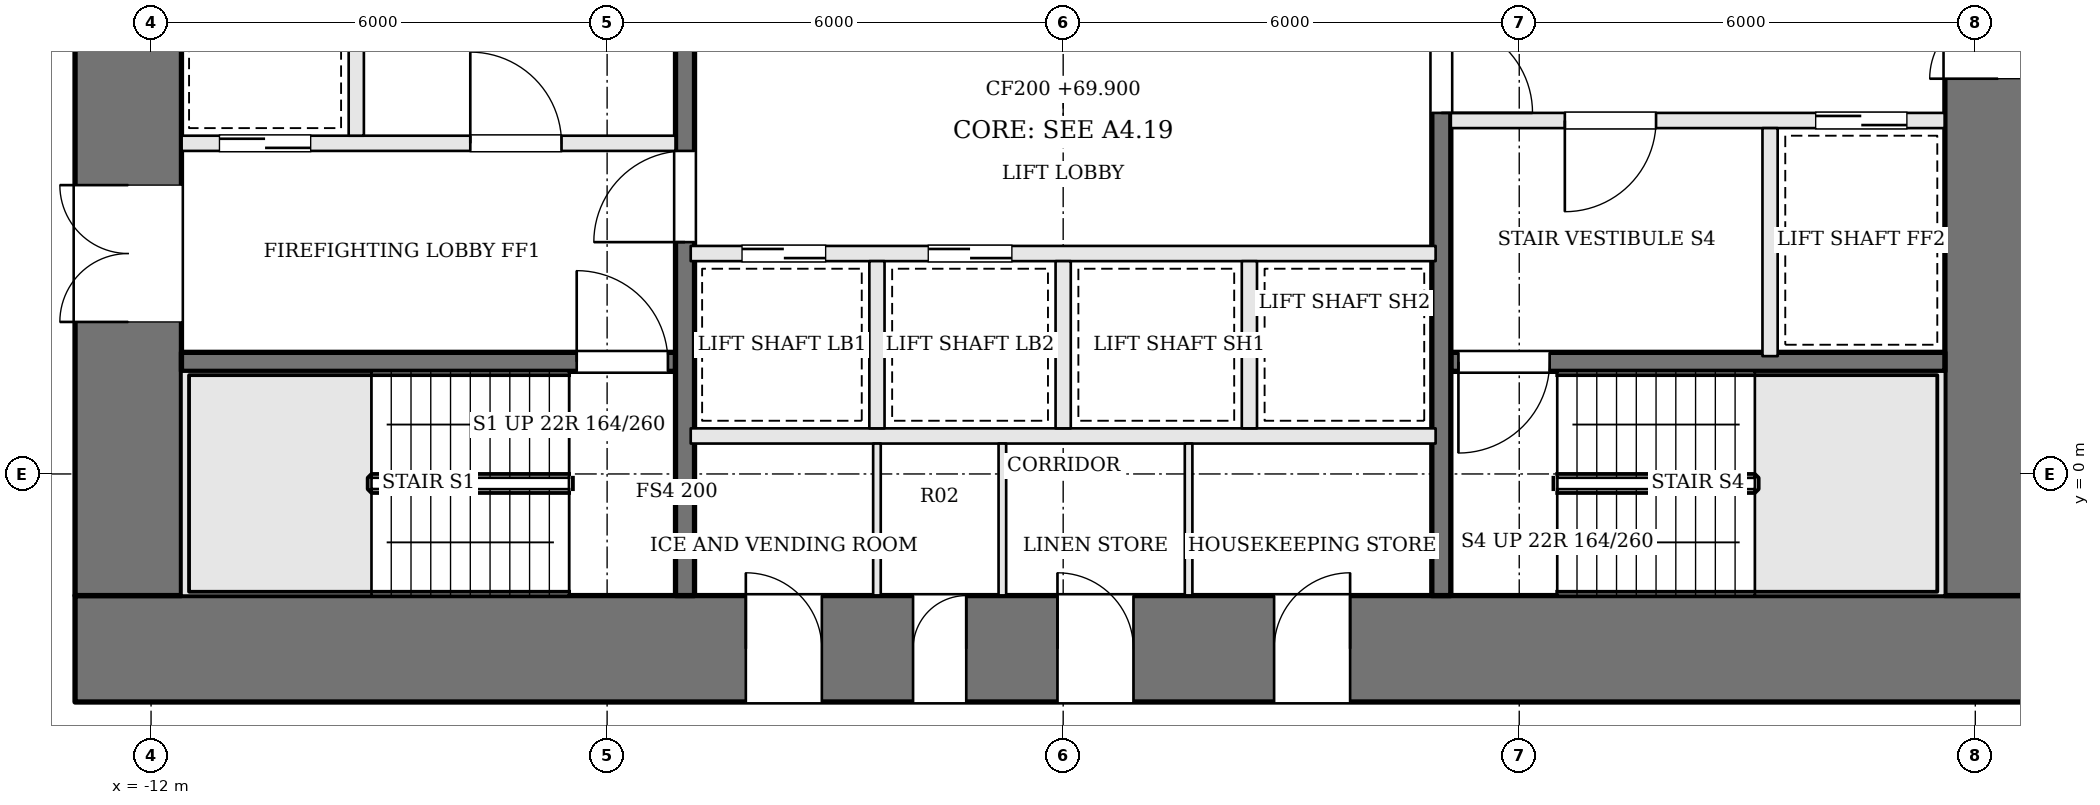
"""IFC4 building model, lengths in metres.
Left out: names, types, materials, properties, quantities, classifications, styles, units other than length and angle.
Written with IfcOpenShell. Run it as: python <this file> out.ifc"""

import sys

from ifc_helpers import new_model, si_unit, direction, frame, frame_2d, origin, place, context, subcontext, project, spatial, rectangle, extrude, element, fill, save


model = new_model("IFC4")
c1 = context("Model", 3, precision=1e-05, world=origin(), true_north=direction((0.0, 1.0)))
c2 = subcontext(c1, "Body", "Model", "MODEL_VIEW")
j1 = project(units=[si_unit("LENGTHUNIT", "METRE"), si_unit("PLANEANGLEUNIT", "RADIAN")], contexts=[c1])
p1 = place(None, origin())
s1 = spatial("IfcSite", under=j1, at=p1, CompositionType="ELEMENT")
p2 = place(p1, origin())
s2 = spatial("IfcBuilding", under=s1, at=p2, CompositionType="ELEMENT")
p3 = place(p2, frame((0.0, 0.0, 69.9)))
s3 = spatial("IfcBuildingStorey", under=s2, at=p3, CompositionType="ELEMENT", Elevation=69.9)
p4 = place(p3, frame((-13.0, -2.3, 0.0), z_axis=(0.0, 0.0, 1.0), x_axis=(1.0, 0.0, 0.0)))
e1 = element("IfcWall", 1, at=p4, inside=s3, PredefinedType="SHEAR", context=c2, shape_type="SweptSolid", body=[
    extrude(rectangle(XDim=26.0, YDim=1.4, at=frame_2d((13.0, 0.0))), origin(), (0.0, 0.0, 1.0), 3.6),
])
p5 = place(p4, frame((8.825, 0.0, 0.0)))
e2 = element("IfcOpeningElement", 2, at=p5, cuts=e1, PredefinedType="OPENING", context=c2, shape_type="SweptSolid", body=[
    extrude(rectangle(XDim=1.0, YDim=2.1, at=frame_2d((0.5, 1.05))), frame((0.0, 0.71, 0.0), z_axis=(0.0, -1.0, 0.0), x_axis=(1.0, 0.0, 0.0)), (0.0, 0.0, 1.0), 1.42),
])
p6 = place(p4, frame((11.025, 0.0, 0.0)))
e3 = element("IfcOpeningElement", 3, at=p6, cuts=e1, PredefinedType="OPENING", context=c2, shape_type="SweptSolid", body=[
    extrude(rectangle(XDim=0.7, YDim=2.1, at=frame_2d((0.35, 1.05))), frame((0.0, 0.71, 0.0), z_axis=(0.0, -1.0, 0.0), x_axis=(1.0, 0.0, 0.0)), (0.0, 0.0, 1.0), 1.42),
])
p7 = place(p4, frame((12.925, 0.0, 0.0)))
e4 = element("IfcOpeningElement", 4, at=p7, cuts=e1, PredefinedType="OPENING", context=c2, shape_type="SweptSolid", body=[
    extrude(rectangle(XDim=1.0, YDim=2.1, at=frame_2d((0.5, 1.05))), frame((0.0, 0.71, 0.0), z_axis=(0.0, -1.0, 0.0), x_axis=(1.0, 0.0, 0.0)), (0.0, 0.0, 1.0), 1.42),
])
p8 = place(p4, frame((15.775, 0.0, 0.0)))
e5 = element("IfcOpeningElement", 5, at=p8, cuts=e1, PredefinedType="OPENING", context=c2, shape_type="SweptSolid", body=[
    extrude(rectangle(XDim=1.0, YDim=2.1, at=frame_2d((0.5, 1.05))), frame((0.0, 0.71, 0.0), z_axis=(0.0, -1.0, 0.0), x_axis=(1.0, 0.0, 0.0)), (0.0, 0.0, 1.0), 1.42),
])
p9 = place(p3, frame((12.3, -1.6, 0.0), z_axis=(0.0, 0.0, 1.0), x_axis=(0.0, 1.0, 0.0)))
e6 = element("IfcWall", 6, at=p9, inside=s3, PredefinedType="SHEAR", context=c2, shape_type="SweptSolid", body=[
    extrude(rectangle(XDim=12.2, YDim=1.4, at=frame_2d((6.1, 0.0))), origin(), (0.0, 0.0, 1.0), 3.6),
])
p10 = place(p9, frame((6.8, 0.0, 0.0)))
e7 = element("IfcOpeningElement", 7, at=p10, cuts=e6, PredefinedType="OPENING", context=c2, shape_type="SweptSolid", body=[
    extrude(rectangle(XDim=1.8, YDim=2.1, at=frame_2d((0.9, 1.05))), frame((0.0, 0.71, 0.0), z_axis=(0.0, -1.0, 0.0), x_axis=(1.0, 0.0, 0.0)), (0.0, 0.0, 1.0), 1.42),
])
p11 = place(p3, frame((-12.3, -1.6, 0.0), z_axis=(0.0, 0.0, 1.0), x_axis=(0.0, 1.0, 0.0)))
e8 = element("IfcWall", 8, at=p11, inside=s3, PredefinedType="SHEAR", context=c2, shape_type="SweptSolid", body=[
    extrude(rectangle(XDim=12.2, YDim=1.4, at=frame_2d((6.1, 0.0))), origin(), (0.0, 0.0, 1.0), 3.6),
])
p12 = place(p11, frame((3.6, 0.0, 0.0)))
e9 = element("IfcOpeningElement", 9, at=p12, cuts=e8, PredefinedType="OPENING", context=c2, shape_type="SweptSolid", body=[
    extrude(rectangle(XDim=1.8, YDim=2.1, at=frame_2d((0.9, 1.05))), frame((0.0, 0.71, 0.0), z_axis=(0.0, -1.0, 0.0), x_axis=(1.0, 0.0, 0.0)), (0.0, 0.0, 1.0), 1.42),
])
p13 = place(p3, frame((-11.6, 1.475, 0.0), z_axis=(0.0, 0.0, 1.0), x_axis=(1.0, 0.0, 0.0)))
e10 = element("IfcWall", 10, at=p13, inside=s3, PredefinedType="SOLIDWALL", context=c2, shape_type="SweptSolid", body=[
    extrude(rectangle(XDim=6.5, YDim=0.25, at=frame_2d((3.25, 0.0))), origin(), (0.0, 0.0, 1.0), 3.4),
])
p14 = place(p13, frame((5.2, 0.0, 0.0)))
e11 = element("IfcOpeningElement", 11, at=p14, cuts=e10, PredefinedType="OPENING", context=c2, shape_type="SweptSolid", body=[
    extrude(rectangle(XDim=1.2, YDim=2.1, at=frame_2d((0.6, 1.05))), frame((0.0, 0.135, 0.0), z_axis=(0.0, -1.0, 0.0), x_axis=(1.0, 0.0, 0.0)), (0.0, 0.0, 1.0), 0.27),
])
p15 = place(p3, frame((-11.6, 4.35, 0.0), z_axis=(0.0, 0.0, 1.0), x_axis=(1.0, 0.0, 0.0)))
e12 = element("IfcWall", 12, at=p15, inside=s3, PredefinedType="SOLIDWALL", context=c2, shape_type="SweptSolid", body=[
    extrude(rectangle(XDim=6.5, YDim=0.2, at=frame_2d((3.25, 0.0))), origin(), (0.0, 0.0, 1.0), 3.4),
])
p16 = place(p15, frame((3.8, 0.0, 0.0)))
e13 = element("IfcOpeningElement", 13, at=p16, cuts=e12, PredefinedType="OPENING", context=c2, shape_type="SweptSolid", body=[
    extrude(rectangle(XDim=1.2, YDim=2.1, at=frame_2d((0.6, 1.05))), frame((0.0, 0.11, 0.0), z_axis=(0.0, -1.0, 0.0), x_axis=(1.0, 0.0, 0.0)), (0.0, 0.0, 1.0), 0.22),
])
p17 = place(p15, frame((0.5, 0.0, 0.0)))
e14 = element("IfcOpeningElement", 14, at=p17, cuts=e12, PredefinedType="OPENING", context=c2, shape_type="SweptSolid", body=[
    extrude(rectangle(XDim=1.2, YDim=2.1, at=frame_2d((0.6, 1.05))), frame((0.0, 0.11, 0.0), z_axis=(0.0, -1.0, 0.0), x_axis=(1.0, 0.0, 0.0)), (0.0, 0.0, 1.0), 0.22),
])
p18 = place(p3, frame((11.6, 4.65, 0.0), z_axis=(0.0, 0.0, 1.0), x_axis=(-1.0, 0.0, 0.0)))
e15 = element("IfcWall", 15, at=p18, inside=s3, PredefinedType="SOLIDWALL", context=c2, shape_type="SweptSolid", body=[
    extrude(rectangle(XDim=6.5, YDim=0.2, at=frame_2d((3.25, 0.0))), origin(), (0.0, 0.0, 1.0), 3.4),
])
p19 = place(p18, frame((3.8, 0.0, 0.0)))
e16 = element("IfcOpeningElement", 16, at=p19, cuts=e15, PredefinedType="OPENING", context=c2, shape_type="SweptSolid", body=[
    extrude(rectangle(XDim=1.2, YDim=2.1, at=frame_2d((0.6, 1.05))), frame((0.0, 0.11, 0.0), z_axis=(0.0, -1.0, 0.0), x_axis=(1.0, 0.0, 0.0)), (0.0, 0.0, 1.0), 0.22),
])
p20 = place(p18, frame((0.5, 0.0, 0.0)))
e17 = element("IfcOpeningElement", 17, at=p20, cuts=e15, PredefinedType="OPENING", context=c2, shape_type="SweptSolid", body=[
    extrude(rectangle(XDim=1.2, YDim=2.1, at=frame_2d((0.6, 1.05))), frame((0.0, 0.11, 0.0), z_axis=(0.0, -1.0, 0.0), x_axis=(1.0, 0.0, 0.0)), (0.0, 0.0, 1.0), 0.22),
])
p21 = place(p3, frame((11.6, 1.475, 0.0), z_axis=(0.0, 0.0, 1.0), x_axis=(-1.0, 0.0, 0.0)))
e18 = element("IfcWall", 18, at=p21, inside=s3, PredefinedType="SOLIDWALL", context=c2, shape_type="SweptSolid", body=[
    extrude(rectangle(XDim=6.5, YDim=0.25, at=frame_2d((3.25, 0.0))), origin(), (0.0, 0.0, 1.0), 3.4),
])
p22 = place(p21, frame((5.2, 0.0, 0.0)))
e19 = element("IfcOpeningElement", 19, at=p22, cuts=e18, PredefinedType="OPENING", context=c2, shape_type="SweptSolid", body=[
    extrude(rectangle(XDim=1.2, YDim=2.1, at=frame_2d((0.6, 1.05))), frame((0.0, 0.135, 0.0), z_axis=(0.0, -1.0, 0.0), x_axis=(1.0, 0.0, 0.0)), (0.0, 0.0, 1.0), 0.27),
])
for number, where, z_axis, x_axis in (
    (20, (-9.3, 4.45, 0.0), (0.0, 0.0, 1.0), (0.0, 1.0, 0.0)),
    (21, (9.3, 4.55, 0.0), (0.0, 0.0, 1.0), (0.0, -1.0, 0.0)),
):
    element("IfcWall", number, at=place(p3, frame(where, z_axis=z_axis, x_axis=x_axis)), inside=s3, PredefinedType="SOLIDWALL", context=c2, shape_type="SweptSolid", body=[
        extrude(rectangle(XDim=3.0, YDim=0.2, at=frame_2d((1.5, 0.0))), origin(), (0.0, 0.0, 1.0), 3.4),
    ])
p23 = place(p3, frame((-4.975, -1.6, 0.0), z_axis=(0.0, 0.0, 1.0), x_axis=(0.0, 1.0, 0.0)))
e22 = element("IfcWall", 22, at=p23, inside=s3, PredefinedType="SOLIDWALL", context=c2, shape_type="SweptSolid", body=[
    extrude(rectangle(XDim=12.2, YDim=0.25, at=frame_2d((6.1, 0.0))), origin(), (0.0, 0.0, 1.0), 3.4),
])
p24 = place(p23, frame((4.65, 0.0, 0.0)))
e23 = element("IfcOpeningElement", 23, at=p24, cuts=e22, PredefinedType="OPENING", context=c2, shape_type="SweptSolid", body=[
    extrude(rectangle(XDim=1.2, YDim=2.1, at=frame_2d((0.6, 1.05))), frame((0.0, 0.135, 0.0), z_axis=(0.0, -1.0, 0.0), x_axis=(1.0, 0.0, 0.0)), (0.0, 0.0, 1.0), 0.27),
])
p25 = place(p3, frame((4.975, 10.6, 0.0), z_axis=(0.0, 0.0, 1.0), x_axis=(0.0, -1.0, 0.0)))
e24 = element("IfcWall", 24, at=p25, inside=s3, PredefinedType="SOLIDWALL", context=c2, shape_type="SweptSolid", body=[
    extrude(rectangle(XDim=12.2, YDim=0.25, at=frame_2d((6.1, 0.0))), origin(), (0.0, 0.0, 1.0), 3.4),
])
p26 = place(p25, frame((4.65, 0.0, 0.0)))
e25 = element("IfcOpeningElement", 25, at=p26, cuts=e24, PredefinedType="OPENING", context=c2, shape_type="SweptSolid", body=[
    extrude(rectangle(XDim=1.2, YDim=2.1, at=frame_2d((0.6, 1.05))), frame((0.0, 0.135, 0.0), z_axis=(0.0, -1.0, 0.0), x_axis=(1.0, 0.0, 0.0)), (0.0, 0.0, 1.0), 0.27),
])
p27 = place(p3, frame((-4.9, 0.5, 0.0), z_axis=(0.0, 0.0, 1.0), x_axis=(1.0, 0.0, 0.0)))
e26 = element("IfcWall", 26, at=p27, inside=s3, PredefinedType="SOLIDWALL", context=c2, shape_type="SweptSolid", body=[
    extrude(rectangle(XDim=9.8, YDim=0.2, at=frame_2d((4.9, 0.0))), origin(), (0.0, 0.0, 1.0), 3.4),
])
p28 = place(p3, frame((-4.9, 2.9, 0.0), z_axis=(0.0, 0.0, 1.0), x_axis=(1.0, 0.0, 0.0)))
e27 = element("IfcWall", 27, at=p28, inside=s3, PredefinedType="SOLIDWALL", context=c2, shape_type="SweptSolid", body=[
    extrude(rectangle(XDim=9.8, YDim=0.2, at=frame_2d((4.9, 0.0))), origin(), (0.0, 0.0, 1.0), 3.4),
])
p29 = place(p28, frame((0.675, 0.0, 0.0)))
e28 = element("IfcOpeningElement", 28, at=p29, cuts=e27, PredefinedType="OPENING", context=c2, shape_type="SweptSolid", body=[
    extrude(rectangle(XDim=1.1, YDim=2.1, at=frame_2d((0.55, 1.05))), frame((0.0, 0.11, 0.0), z_axis=(0.0, -1.0, 0.0), x_axis=(1.0, 0.0, 0.0)), (0.0, 0.0, 1.0), 0.22),
])
p30 = place(p28, frame((3.125, 0.0, 0.0)))
e29 = element("IfcOpeningElement", 29, at=p30, cuts=e27, PredefinedType="OPENING", context=c2, shape_type="SweptSolid", body=[
    extrude(rectangle(XDim=1.1, YDim=2.1, at=frame_2d((0.55, 1.05))), frame((0.0, 0.11, 0.0), z_axis=(0.0, -1.0, 0.0), x_axis=(1.0, 0.0, 0.0)), (0.0, 0.0, 1.0), 0.22),
])
for number, where, z_axis, x_axis in (
    (30, (-2.45, 0.6, 0.0), (0.0, 0.0, 1.0), (0.0, 1.0, 0.0)),
    (31, (0.0, 0.6, 0.0), (0.0, 0.0, 1.0), (0.0, 1.0, 0.0)),
    (32, (2.45, 0.6, 0.0), (0.0, 0.0, 1.0), (0.0, 1.0, 0.0)),
):
    element("IfcWall", number, at=place(p3, frame(where, z_axis=z_axis, x_axis=x_axis)), inside=s3, PredefinedType="SOLIDWALL", context=c2, shape_type="SweptSolid", body=[
        extrude(rectangle(XDim=2.2, YDim=0.2, at=frame_2d((1.1, 0.0))), origin(), (0.0, 0.0, 1.0), 3.4),
    ])
for number, where, z_axis, x_axis in (
    (33, (-2.45, -1.6, 0.0), (0.0, 0.0, 1.0), (0.0, 1.0, 0.0)),
    (34, (-0.8, -1.6, 0.0), (0.0, 0.0, 1.0), (0.0, 1.0, 0.0)),
    (35, (1.65, -1.6, 0.0), (0.0, 0.0, 1.0), (0.0, 1.0, 0.0)),
):
    element("IfcWall", number, at=place(p3, frame(where, z_axis=z_axis, x_axis=x_axis)), inside=s3, PredefinedType="PARTITIONING", context=c2, shape_type="SweptSolid", body=[
        extrude(rectangle(XDim=2.0, YDim=0.1, at=frame_2d((1.0, 0.0))), origin(), (0.0, 0.0, 1.0), 3.4),
    ])
p31 = place(p12, origin())
e36 = element("IfcDoor", 36, at=p31, inside=s3, OperationType="DOUBLE_DOOR_SINGLE_SWING", PredefinedType="DOOR", context=c2, shape_type="SweptSolid", body=[
    extrude(rectangle(XDim=1.8, YDim=2.1, at=frame_2d((0.9, 1.05))), frame((0.0, 0.025, 0.0), z_axis=(0.0, -1.0, 0.0), x_axis=(1.0, 0.0, 0.0)), (0.0, 0.0, 1.0), 0.05),
])
fill(e9, e36)
p32 = place(p10, origin())
e37 = element("IfcDoor", 37, at=p32, inside=s3, OperationType="DOUBLE_DOOR_SINGLE_SWING", PredefinedType="DOOR", context=c2, shape_type="SweptSolid", body=[
    extrude(rectangle(XDim=1.8, YDim=2.1, at=frame_2d((0.9, 1.05))), frame((0.0, 0.025, 0.0), z_axis=(0.0, -1.0, 0.0), x_axis=(1.0, 0.0, 0.0)), (0.0, 0.0, 1.0), 0.05),
])
fill(e7, e37)
p33 = place(p24, origin())
e38 = element("IfcDoor", 38, at=p33, inside=s3, OperationType="SINGLE_SWING_LEFT", PredefinedType="DOOR", context=c2, shape_type="SweptSolid", body=[
    extrude(rectangle(XDim=1.2, YDim=2.1, at=frame_2d((0.6, 1.05))), frame((0.0, 0.025, 0.0), z_axis=(0.0, -1.0, 0.0), x_axis=(1.0, 0.0, 0.0)), (0.0, 0.0, 1.0), 0.05),
])
fill(e23, e38)
p34 = place(p26, origin())
e39 = element("IfcDoor", 39, at=p34, inside=s3, OperationType="SINGLE_SWING_RIGHT", PredefinedType="DOOR", context=c2, shape_type="SweptSolid", body=[
    extrude(rectangle(XDim=1.2, YDim=2.1, at=frame_2d((0.6, 1.05))), frame((0.0, 0.025, 0.0), z_axis=(0.0, -1.0, 0.0), x_axis=(1.0, 0.0, 0.0)), (0.0, 0.0, 1.0), 0.05),
])
fill(e25, e39)
p35 = place(p16, origin())
e40 = element("IfcDoor", 40, at=p35, inside=s3, OperationType="SINGLE_SWING_LEFT", PredefinedType="DOOR", context=c2, shape_type="SweptSolid", body=[
    extrude(rectangle(XDim=1.2, YDim=2.1, at=frame_2d((0.6, 1.05))), frame((0.0, 0.025, 0.0), z_axis=(0.0, -1.0, 0.0), x_axis=(1.0, 0.0, 0.0)), (0.0, 0.0, 1.0), 0.05),
])
fill(e13, e40)
p36 = place(p19, origin())
e41 = element("IfcDoor", 41, at=p36, inside=s3, OperationType="SINGLE_SWING_RIGHT", PredefinedType="DOOR", context=c2, shape_type="SweptSolid", body=[
    extrude(rectangle(XDim=1.2, YDim=2.1, at=frame_2d((0.6, 1.05))), frame((0.0, 0.025, 0.0), z_axis=(0.0, -1.0, 0.0), x_axis=(1.0, 0.0, 0.0)), (0.0, 0.0, 1.0), 0.05),
])
fill(e16, e41)
p37 = place(p14, origin())
e42 = element("IfcDoor", 42, at=p37, inside=s3, OperationType="SINGLE_SWING_LEFT", PredefinedType="DOOR", context=c2, shape_type="SweptSolid", body=[
    extrude(rectangle(XDim=1.2, YDim=2.1, at=frame_2d((0.6, 1.05))), frame((0.0, 0.025, 0.0), z_axis=(0.0, -1.0, 0.0), x_axis=(1.0, 0.0, 0.0)), (0.0, 0.0, 1.0), 0.05),
])
fill(e11, e42)
p38 = place(p22, origin())
e43 = element("IfcDoor", 43, at=p38, inside=s3, OperationType="SINGLE_SWING_RIGHT", PredefinedType="DOOR", context=c2, shape_type="SweptSolid", body=[
    extrude(rectangle(XDim=1.2, YDim=2.1, at=frame_2d((0.6, 1.05))), frame((0.0, 0.025, 0.0), z_axis=(0.0, -1.0, 0.0), x_axis=(1.0, 0.0, 0.0)), (0.0, 0.0, 1.0), 0.05),
])
fill(e19, e43)
p39 = place(p17, origin())
e44 = element("IfcDoor", 44, at=p39, inside=s3, OperationType="SLIDING_TO_RIGHT", PredefinedType="DOOR", context=c2, shape_type="SweptSolid", body=[
    extrude(rectangle(XDim=1.2, YDim=2.1, at=frame_2d((0.6, 1.05))), frame((0.0, 0.025, 0.0), z_axis=(0.0, -1.0, 0.0), x_axis=(1.0, 0.0, 0.0)), (0.0, 0.0, 1.0), 0.05),
])
fill(e14, e44)
p40 = place(p20, origin())
e45 = element("IfcDoor", 45, at=p40, inside=s3, OperationType="SLIDING_TO_RIGHT", PredefinedType="DOOR", context=c2, shape_type="SweptSolid", body=[
    extrude(rectangle(XDim=1.2, YDim=2.1, at=frame_2d((0.6, 1.05))), frame((0.0, 0.025, 0.0), z_axis=(0.0, -1.0, 0.0), x_axis=(1.0, 0.0, 0.0)), (0.0, 0.0, 1.0), 0.05),
])
fill(e17, e45)
p41 = place(p29, origin())
e46 = element("IfcDoor", 46, at=p41, inside=s3, OperationType="SLIDING_TO_RIGHT", PredefinedType="DOOR", context=c2, shape_type="SweptSolid", body=[
    extrude(rectangle(XDim=1.1, YDim=2.1, at=frame_2d((0.55, 1.05))), frame((0.0, 0.025, 0.0), z_axis=(0.0, -1.0, 0.0), x_axis=(1.0, 0.0, 0.0)), (0.0, 0.0, 1.0), 0.05),
])
fill(e28, e46)
p42 = place(p30, origin())
e47 = element("IfcDoor", 47, at=p42, inside=s3, OperationType="SLIDING_TO_LEFT", PredefinedType="DOOR", context=c2, shape_type="SweptSolid", body=[
    extrude(rectangle(XDim=1.1, YDim=2.1, at=frame_2d((0.55, 1.05))), frame((0.0, 0.025, 0.0), z_axis=(0.0, -1.0, 0.0), x_axis=(1.0, 0.0, 0.0)), (0.0, 0.0, 1.0), 0.05),
])
fill(e29, e47)
p43 = place(p5, origin())
e48 = element("IfcDoor", 48, at=p43, inside=s3, OperationType="SINGLE_SWING_LEFT", PredefinedType="DOOR", context=c2, shape_type="SweptSolid", body=[
    extrude(rectangle(XDim=1.0, YDim=2.1, at=frame_2d((0.5, 1.05))), frame((0.0, 0.025, 0.0), z_axis=(0.0, -1.0, 0.0), x_axis=(1.0, 0.0, 0.0)), (0.0, 0.0, 1.0), 0.05),
])
fill(e2, e48)
p44 = place(p6, origin())
e49 = element("IfcDoor", 49, at=p44, inside=s3, OperationType="SINGLE_SWING_RIGHT", PredefinedType="DOOR", context=c2, shape_type="SweptSolid", body=[
    extrude(rectangle(XDim=0.7, YDim=2.1, at=frame_2d((0.35, 1.05))), frame((0.0, 0.025, 0.0), z_axis=(0.0, -1.0, 0.0), x_axis=(1.0, 0.0, 0.0)), (0.0, 0.0, 1.0), 0.05),
])
fill(e3, e49)
p45 = place(p7, origin())
e50 = element("IfcDoor", 50, at=p45, inside=s3, OperationType="SINGLE_SWING_LEFT", PredefinedType="DOOR", context=c2, shape_type="SweptSolid", body=[
    extrude(rectangle(XDim=1.0, YDim=2.1, at=frame_2d((0.5, 1.05))), frame((0.0, 0.025, 0.0), z_axis=(0.0, -1.0, 0.0), x_axis=(1.0, 0.0, 0.0)), (0.0, 0.0, 1.0), 0.05),
])
fill(e4, e50)
p46 = place(p8, origin())
e51 = element("IfcDoor", 51, at=p46, inside=s3, OperationType="SINGLE_SWING_RIGHT", PredefinedType="DOOR", context=c2, shape_type="SweptSolid", body=[
    extrude(rectangle(XDim=1.0, YDim=2.1, at=frame_2d((0.5, 1.05))), frame((0.0, 0.025, 0.0), z_axis=(0.0, -1.0, 0.0), x_axis=(1.0, 0.0, 0.0)), (0.0, 0.0, 1.0), 0.05),
])
fill(e5, e51)
save(model, sys.argv[1])
